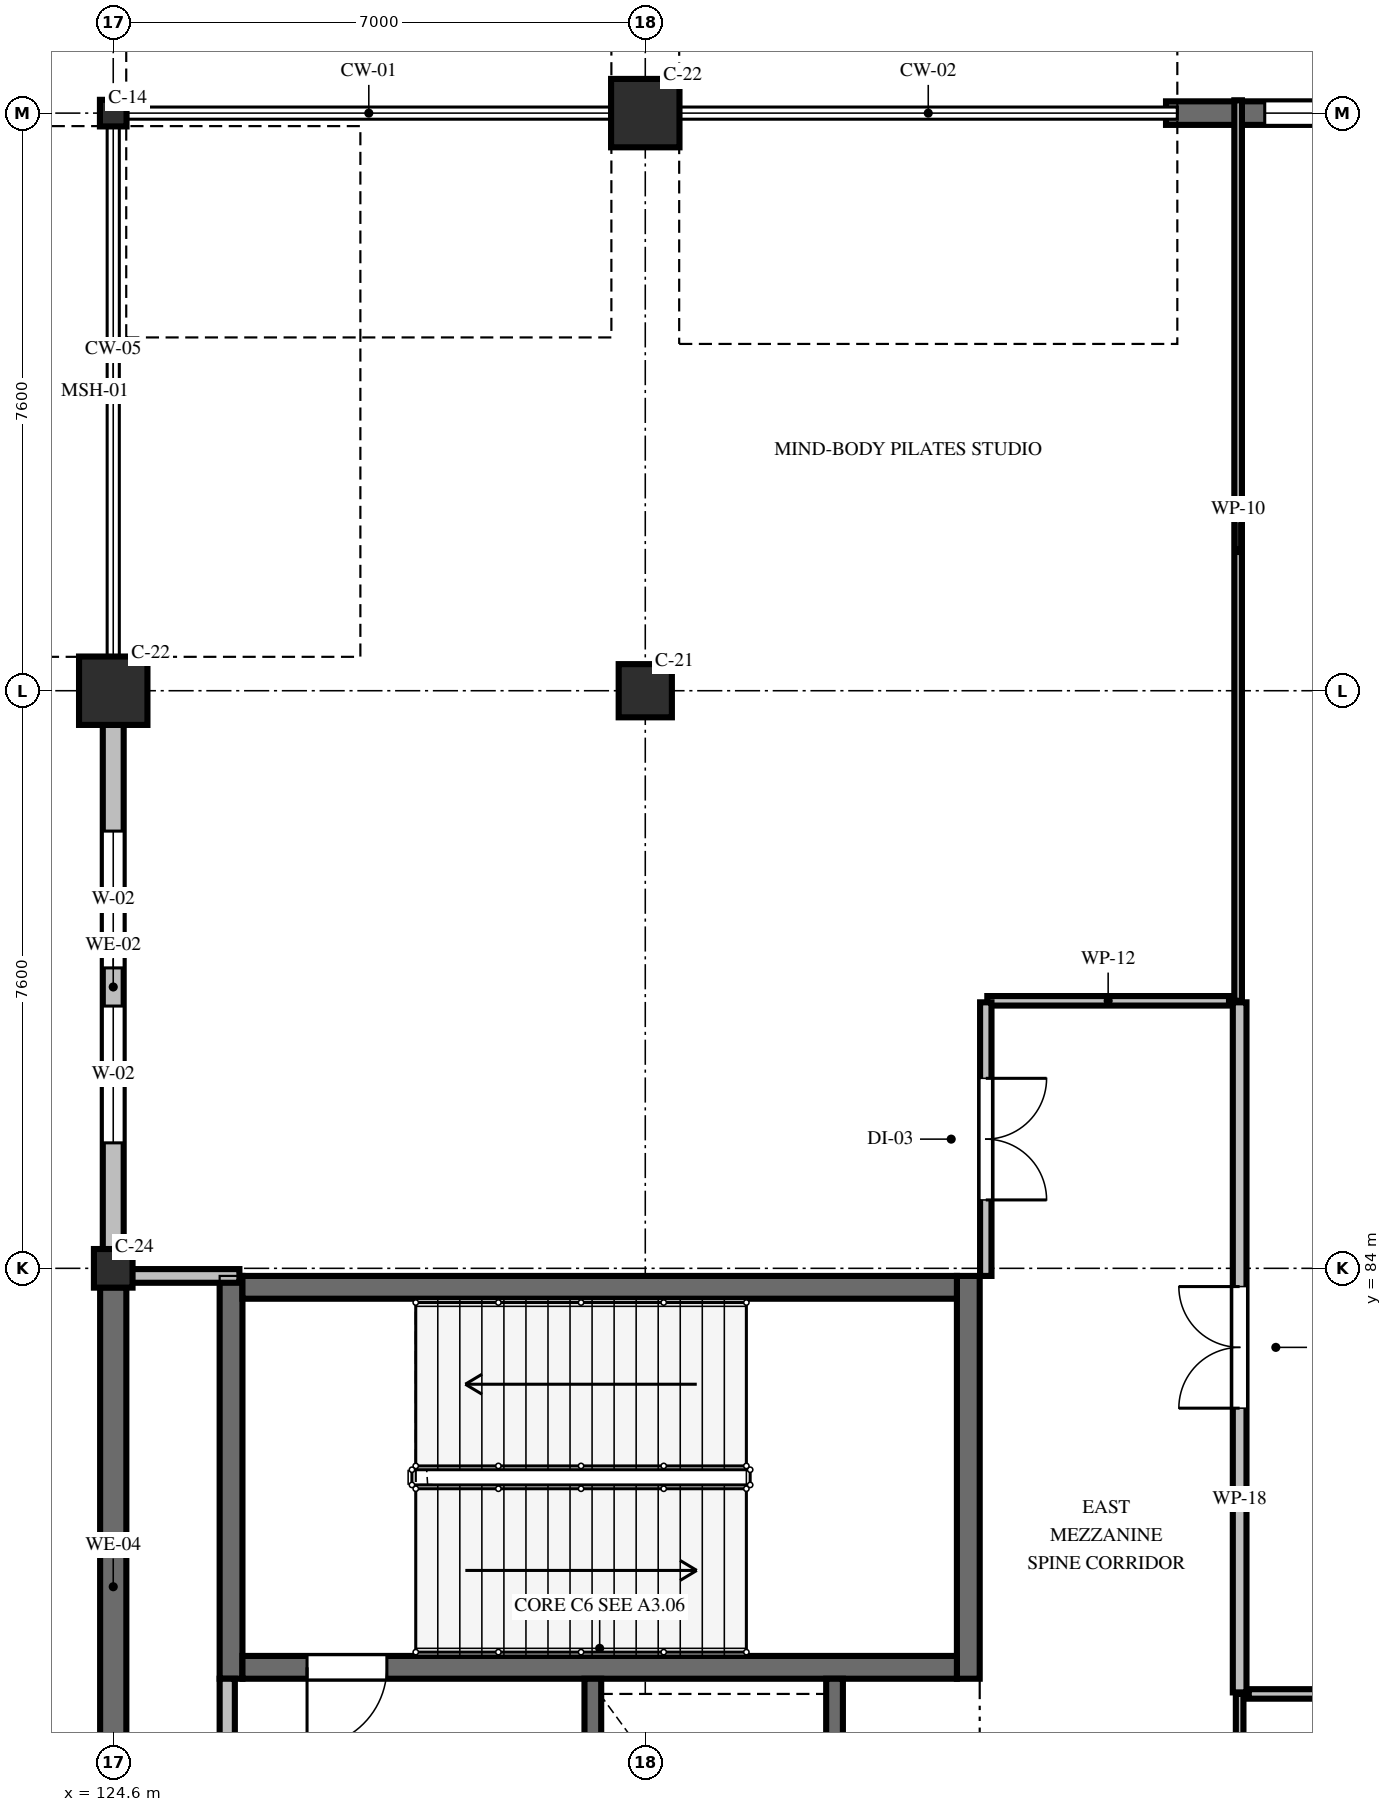
"""IFC4 building model, lengths in metres.
Left out: names, types, materials, properties, quantities, classifications, styles, units other than length and angle.
Written with IfcOpenShell. Run it as: python <this file> out.ifc"""

import sys

from ifc_helpers import new_model, si_unit, direction, frame, frame_2d, origin, origin_2d, place, context, subcontext, project, spatial, rectangle, hollow_rectangle, hollow_circle, i_section, extrude, element, fill, save


model = new_model("IFC4")
c1 = context("Model", 3, precision=1e-05, world=origin(), true_north=direction((0.0, 1.0)))
c2 = subcontext(c1, "Body", "Model", "MODEL_VIEW")
j1 = project(units=[si_unit("LENGTHUNIT", "METRE"), si_unit("PLANEANGLEUNIT", "RADIAN")], contexts=[c1])
p1 = place(None, origin())
s1 = spatial("IfcSite", under=j1, at=p1, CompositionType="ELEMENT")
p2 = place(p1, origin())
s2 = spatial("IfcBuilding", under=s1, at=p2, CompositionType="ELEMENT")
p3 = place(p2, frame((0.0, 0.0, 5.4)))
s3 = spatial("IfcBuildingStorey", under=s2, at=p3, CompositionType="ELEMENT", Elevation=5.4)
p4 = place(p3, frame((124.6, 84.0, 0.0), z_axis=(0.0, 0.0, 1.0), x_axis=(1.0, 0.0, 0.0)))
e1 = element("IfcColumn", 1, at=p4, inside=s3, PredefinedType="COLUMN", context=c2, shape_type="SweptSolid", body=[
    extrude(hollow_circle(Radius=0.254, WallThickness=0.019, at=origin_2d()), origin(), (0.0, 0.0, 1.0), 5.4),
])
p5 = place(p3, frame((124.6, 91.6, 0.0), z_axis=(0.0, 0.0, 1.0), x_axis=(1.0, 0.0, 0.0)))
e2 = element("IfcColumn", 2, at=p5, inside=s3, PredefinedType="COLUMN", context=c2, shape_type="SweptSolid", body=[
    extrude(hollow_rectangle(XDim=0.9, YDim=0.9, WallThickness=0.036, InnerFilletRadius=0.036, OuterFilletRadius=0.072, at=origin_2d()), origin(), (0.0, 0.0, 1.0), 5.4),
])
p6 = place(p3, frame((124.6, 99.2, 0.0), z_axis=(0.0, 0.0, 1.0), x_axis=(1.0, 0.0, 0.0)))
e3 = element("IfcColumn", 3, at=p6, inside=s3, PredefinedType="COLUMN", context=c2, shape_type="SweptSolid", body=[
    extrude(i_section(OverallWidth=0.35, OverallDepth=0.35, WebThickness=0.012, FlangeThickness=0.019, FilletRadius=0.013, at=origin_2d()), origin(), (0.0, 0.0, 1.0), 5.4),
])
p7 = place(p3, frame((131.6, 91.6, 0.0), z_axis=(0.0, 0.0, 1.0), x_axis=(1.0, 0.0, 0.0)))
e4 = element("IfcColumn", 4, at=p7, inside=s3, PredefinedType="COLUMN", context=c2, shape_type="SweptSolid", body=[
    extrude(hollow_rectangle(XDim=0.7, YDim=0.7, WallThickness=0.028, InnerFilletRadius=0.028, OuterFilletRadius=0.056, at=origin_2d()), origin(), (0.0, 0.0, 1.0), 5.4),
])
p8 = place(p3, frame((131.6, 99.2, 0.0), z_axis=(0.0, 0.0, 1.0), x_axis=(1.0, 0.0, 0.0)))
e5 = element("IfcColumn", 5, at=p8, inside=s3, PredefinedType="COLUMN", context=c2, shape_type="SweptSolid", body=[
    extrude(hollow_rectangle(XDim=0.9, YDim=0.9, WallThickness=0.036, InnerFilletRadius=0.036, OuterFilletRadius=0.072, at=origin_2d()), origin(), (0.0, 0.0, 1.0), 5.4),
])
p9 = place(p3, frame((124.6, 75.871, 0.0), z_axis=(0.0, 0.0, 1.0), x_axis=(0.0, 1.0, 0.0)))
e6 = element("IfcWall", 6, at=p9, inside=s3, PredefinedType="SOLIDWALL", context=c2, shape_type="SweptSolid", body=[
    extrude(rectangle(XDim=7.879, YDim=0.345, at=frame_2d((3.939, 0.0))), origin(), (0.0, 0.0, 1.0), 4.578),
])
p10 = place(p3, frame((124.6, 84.25, 0.0), z_axis=(0.0, 0.0, 1.0), x_axis=(0.0, 1.0, 0.0)))
e7 = element("IfcWall", 7, at=p10, inside=s3, PredefinedType="SOLIDWALL", context=c2, shape_type="SweptSolid", body=[
    extrude(rectangle(XDim=6.904, YDim=0.275, at=frame_2d((3.452, 0.0))), origin(), (0.0, 0.0, 1.0), 4.528),
])
p11 = place(p10, frame((1.401, 0.0, 0.9)))
e8 = element("IfcOpeningElement", 8, at=p11, cuts=e7, PredefinedType="OPENING", context=c2, shape_type="SweptSolid", body=[
    extrude(rectangle(XDim=1.8, YDim=1.6, at=frame_2d((0.9, 0.8))), frame((0.0, 0.147, 0.0), z_axis=(0.0, -1.0, 0.0), x_axis=(1.0, 0.0, 0.0)), (0.0, 0.0, 1.0), 0.295),
])
p12 = place(p10, frame((3.703, 0.0, 0.9)))
e9 = element("IfcOpeningElement", 9, at=p12, cuts=e7, PredefinedType="OPENING", context=c2, shape_type="SweptSolid", body=[
    extrude(rectangle(XDim=1.8, YDim=1.6, at=frame_2d((0.9, 0.8))), frame((0.0, 0.147, 0.0), z_axis=(0.0, -1.0, 0.0), x_axis=(1.0, 0.0, 0.0)), (0.0, 0.0, 1.0), 0.295),
])
p13 = place(p3, frame((138.451, 99.2, 0.0), z_axis=(0.0, 0.0, 1.0), x_axis=(1.0, 0.0, 0.0)))
e10 = element("IfcWall", 10, at=p13, inside=s3, PredefinedType="SOLIDWALL", context=c2, shape_type="SweptSolid", body=[
    extrude(rectangle(XDim=6.803, YDim=0.31, at=frame_2d((3.401, 0.0))), origin(), (0.0, 0.0, 1.0), 3.468),
])
p14 = place(p13, frame((1.299, 0.0, 0.9)))
e11 = element("IfcOpeningElement", 11, at=p14, cuts=e10, PredefinedType="OPENING", context=c2, shape_type="SweptSolid", body=[
    extrude(rectangle(XDim=2.1, YDim=1.8, at=frame_2d((1.05, 0.9))), frame((0.0, 0.165, 0.0), z_axis=(0.0, -1.0, 0.0), x_axis=(1.0, 0.0, 0.0)), (0.0, 0.0, 1.0), 0.33),
])
for number, where, z_axis, x_axis in (
    (12, (126.15, 78.6, 0.0), (0.0, 0.0, 1.0), (0.0, 1.0, 0.0)),
    (13, (135.85, 83.9, 0.0), (0.0, 0.0, 1.0), (0.0, -1.0, 0.0)),
):
    element("IfcWall", number, at=place(p3, frame(where, z_axis=z_axis, x_axis=x_axis)), inside=s3, PredefinedType="SHEAR", context=c2, shape_type="SweptSolid", body=[
        extrude(rectangle(XDim=5.3, YDim=0.3, at=frame_2d((2.65, 0.0))), origin(), (0.0, 0.0, 1.0), 5.17),
    ])
p15 = place(p3, frame((135.7, 78.75, 0.0), z_axis=(0.0, 0.0, 1.0), x_axis=(-1.0, 0.0, 0.0)))
e14 = element("IfcWall", 14, at=p15, inside=s3, PredefinedType="SHEAR", context=c2, shape_type="SweptSolid", body=[
    extrude(rectangle(XDim=9.4, YDim=0.3, at=frame_2d((4.7, 0.0))), origin(), (0.0, 0.0, 1.0), 5.17),
])
p16 = place(p15, frame((7.5, 0.0, 0.0)))
e15 = element("IfcOpeningElement", 15, at=p16, cuts=e14, PredefinedType="OPENING", context=c2, shape_type="SweptSolid", body=[
    extrude(rectangle(XDim=1.05, YDim=2.2, at=frame_2d((0.525, 1.1))), frame((0.0, 0.16, 0.0), z_axis=(0.0, -1.0, 0.0), x_axis=(1.0, 0.0, 0.0)), (0.0, 0.0, 1.0), 0.32),
])
p17 = place(p3, frame((126.3, 83.75, 0.0), z_axis=(0.0, 0.0, 1.0), x_axis=(1.0, 0.0, 0.0)))
e16 = element("IfcWall", 16, at=p17, inside=s3, PredefinedType="SHEAR", context=c2, shape_type="SweptSolid", body=[
    extrude(rectangle(XDim=9.4, YDim=0.3, at=frame_2d((4.7, 0.0))), origin(), (0.0, 0.0, 1.0), 5.17),
])
p18 = place(p3, frame((126.1, 74.1, 0.0), z_axis=(0.0, 0.0, 1.0), x_axis=(0.0, 1.0, 0.0)))
e17 = element("IfcWall", 17, at=p18, inside=s3, PredefinedType="SOLIDWALL", context=c2, shape_type="SweptSolid", body=[
    extrude(rectangle(XDim=4.5, YDim=0.2, at=frame_2d((2.25, 0.0))), origin(), (0.0, 0.0, 1.0), 5.05),
])
p19 = place(p3, frame((130.91, 74.1, 0.0), z_axis=(0.0, 0.0, 1.0), x_axis=(0.0, 1.0, 0.0)))
e18 = element("IfcWall", 18, at=p19, inside=s3, PredefinedType="SOLIDWALL", context=c2, shape_type="SweptSolid", body=[
    extrude(rectangle(XDim=4.5, YDim=0.22, at=frame_2d((2.25, 0.0))), origin(), (0.0, 0.0, 1.0), 5.17),
])
p20 = place(p19, frame((1.65, 0.0, 0.0)))
e19 = element("IfcOpeningElement", 19, at=p20, cuts=e18, PredefinedType="OPENING", context=c2, shape_type="SweptSolid", body=[
    extrude(rectangle(XDim=1.2, YDim=2.2, at=frame_2d((0.6, 1.1))), frame((0.0, 0.12, 0.0), z_axis=(0.0, -1.0, 0.0), x_axis=(1.0, 0.0, 0.0)), (0.0, 0.0, 1.0), 0.24),
])
p21 = place(p3, frame((134.09, 74.1, 0.0), z_axis=(0.0, 0.0, 1.0), x_axis=(0.0, 1.0, 0.0)))
e20 = element("IfcWall", 20, at=p21, inside=s3, PredefinedType="SOLIDWALL", context=c2, shape_type="SweptSolid", body=[
    extrude(rectangle(XDim=4.5, YDim=0.22, at=frame_2d((2.25, 0.0))), origin(), (0.0, 0.0, 1.0), 5.17),
])
p22 = place(p3, frame((139.42, 70.6, 0.0), z_axis=(0.0, 0.0, 1.0), x_axis=(0.0, 1.0, 0.0)))
e21 = element("IfcWall", 21, at=p22, inside=s3, PredefinedType="PARTITIONING", context=c2, shape_type="SweptSolid", body=[
    extrude(rectangle(XDim=7.8, YDim=0.1, at=frame_2d((3.9, 0.0))), origin(), (0.0, 0.0, 1.0), 5.05),
])
p23 = place(p22, frame((3.1, 0.0, 0.0)))
e22 = element("IfcOpeningElement", 22, at=p23, cuts=e21, PredefinedType="OPENING", context=c2, shape_type="SweptSolid", body=[
    extrude(rectangle(XDim=1.6, YDim=2.2, at=frame_2d((0.8, 1.1))), frame((0.0, 0.06, 0.0), z_axis=(0.0, -1.0, 0.0), x_axis=(1.0, 0.0, 0.0)), (0.0, 0.0, 1.0), 0.12),
])
p24 = place(p3, frame((139.54, 78.4, 0.0), z_axis=(0.0, 0.0, 1.0), x_axis=(1.0, 0.0, 0.0)))
e23 = element("IfcWall", 23, at=p24, inside=s3, PredefinedType="PARTITIONING", context=c2, shape_type="SweptSolid", body=[
    extrude(rectangle(XDim=5.74, YDim=0.125, at=frame_2d((2.87, 0.0))), origin(), (0.0, 0.0, 1.0), 4.12),
])
p25 = place(p3, frame((139.42, 78.42, 0.0), z_axis=(0.0, 0.0, 1.0), x_axis=(0.0, 1.0, 0.0)))
e24 = element("IfcWall", 24, at=p25, inside=s3, PredefinedType="PARTITIONING", context=c2, shape_type="SweptSolid", body=[
    extrude(rectangle(XDim=9.08, YDim=0.18, at=frame_2d((4.54, 0.0))), origin(), (0.0, 0.0, 1.0), 5.05),
])
p26 = place(p25, frame((3.74, 0.0, 0.0)))
e25 = element("IfcOpeningElement", 25, at=p26, cuts=e24, PredefinedType="OPENING", context=c2, shape_type="SweptSolid", body=[
    extrude(rectangle(XDim=1.6, YDim=2.2, at=frame_2d((0.8, 1.1))), frame((0.0, 0.1, 0.0), z_axis=(0.0, -1.0, 0.0), x_axis=(1.0, 0.0, 0.0)), (0.0, 0.0, 1.0), 0.2),
])
p27 = place(p3, frame((139.4, 87.52, 0.0), z_axis=(0.0, 0.0, 1.0), x_axis=(0.0, 1.0, 0.0)))
e26 = element("IfcWall", 26, at=p27, inside=s3, PredefinedType="PARTITIONING", context=c2, shape_type="SweptSolid", body=[
    extrude(rectangle(XDim=11.849, YDim=0.1, at=frame_2d((5.924, 0.0))), origin(), (0.0, 0.0, 1.0), 3.47),
])
p28 = place(p3, frame((139.28, 87.52, 0.0), z_axis=(0.0, 0.0, 1.0), x_axis=(-1.0, 0.0, 0.0)))
e27 = element("IfcWall", 27, at=p28, inside=s3, PredefinedType="PARTITIONING", context=c2, shape_type="SweptSolid", body=[
    extrude(rectangle(XDim=3.18, YDim=0.125, at=frame_2d((1.59, 0.0))), origin(), (0.0, 0.0, 1.0), 5.0),
])
p29 = place(p3, frame((136.08, 87.5, 0.0), z_axis=(0.0, 0.0, 1.0), x_axis=(0.0, -1.0, 0.0)))
e28 = element("IfcWall", 28, at=p29, inside=s3, PredefinedType="PARTITIONING", context=c2, shape_type="SweptSolid", body=[
    extrude(rectangle(XDim=3.6, YDim=0.15, at=frame_2d((1.8, 0.0))), origin(), (0.0, 0.0, 1.0), 5.0),
])
p30 = place(p29, frame((1.0, 0.0, 0.0)))
e29 = element("IfcOpeningElement", 29, at=p30, cuts=e28, PredefinedType="OPENING", context=c2, shape_type="SweptSolid", body=[
    extrude(rectangle(XDim=1.6, YDim=2.2, at=frame_2d((0.8, 1.1))), frame((0.0, 0.085, 0.0), z_axis=(0.0, -1.0, 0.0), x_axis=(1.0, 0.0, 0.0)), (0.0, 0.0, 1.0), 0.17),
])
p31 = place(p3, frame((126.26, 83.9, 0.0), z_axis=(0.0, 0.0, 1.0), x_axis=(-1.0, 0.0, 0.0)))
e30 = element("IfcWall", 30, at=p31, inside=s3, PredefinedType="PARTITIONING", context=c2, shape_type="SweptSolid", body=[
    extrude(rectangle(XDim=1.497, YDim=0.18, at=frame_2d((0.749, 0.0))), origin(), (0.0, 0.0, 1.0), 4.58),
])
p32 = place(p11, origin())
e31 = element("IfcWindow", 31, at=p32, inside=s3, PartitioningType="SINGLE_PANEL", PredefinedType="WINDOW", context=c2, shape_type="SweptSolid", body=[
    extrude(rectangle(XDim=1.8, YDim=1.6, at=frame_2d((0.9, 0.8))), frame((0.0, 0.03, 0.0), z_axis=(0.0, -1.0, 0.0), x_axis=(1.0, 0.0, 0.0)), (0.0, 0.0, 1.0), 0.06),
])
fill(e8, e31)
p33 = place(p12, origin())
e32 = element("IfcWindow", 32, at=p33, inside=s3, PartitioningType="SINGLE_PANEL", PredefinedType="WINDOW", context=c2, shape_type="SweptSolid", body=[
    extrude(rectangle(XDim=1.8, YDim=1.6, at=frame_2d((0.9, 0.8))), frame((0.0, 0.03, 0.0), z_axis=(0.0, -1.0, 0.0), x_axis=(1.0, 0.0, 0.0)), (0.0, 0.0, 1.0), 0.06),
])
fill(e9, e32)
p34 = place(p14, origin())
e33 = element("IfcWindow", 33, at=p34, inside=s3, PartitioningType="DOUBLE_PANEL_VERTICAL", PredefinedType="WINDOW", context=c2, shape_type="SweptSolid", body=[
    extrude(rectangle(XDim=2.1, YDim=1.8, at=frame_2d((1.05, 0.9))), frame((0.0, 0.03, 0.0), z_axis=(0.0, -1.0, 0.0), x_axis=(1.0, 0.0, 0.0)), (0.0, 0.0, 1.0), 0.06),
])
fill(e11, e33)
p35 = place(p16, origin())
e34 = element("IfcDoor", 34, at=p35, inside=s3, OperationType="SINGLE_SWING_RIGHT", PredefinedType="DOOR", context=c2, shape_type="SweptSolid", body=[
    extrude(rectangle(XDim=1.05, YDim=2.2, at=frame_2d((0.525, 1.1))), frame((0.0, 0.025, 0.0), z_axis=(0.0, -1.0, 0.0), x_axis=(1.0, 0.0, 0.0)), (0.0, 0.0, 1.0), 0.05),
])
fill(e15, e34)
p36 = place(p26, origin())
e35 = element("IfcDoor", 35, at=p36, inside=s3, OperationType="DOUBLE_DOOR_SINGLE_SWING", PredefinedType="DOOR", context=c2, shape_type="SweptSolid", body=[
    extrude(rectangle(XDim=1.6, YDim=2.2, at=frame_2d((0.8, 1.1))), frame((0.0, 0.025, 0.0), z_axis=(0.0, -1.0, 0.0), x_axis=(1.0, 0.0, 0.0)), (0.0, 0.0, 1.0), 0.05),
])
fill(e25, e35)
p37 = place(p30, origin())
e36 = element("IfcDoor", 36, at=p37, inside=s3, OperationType="DOUBLE_DOOR_SINGLE_SWING", PredefinedType="DOOR", context=c2, shape_type="SweptSolid", body=[
    extrude(rectangle(XDim=1.6, YDim=2.2, at=frame_2d((0.8, 1.1))), frame((0.0, 0.025, 0.0), z_axis=(0.0, -1.0, 0.0), x_axis=(1.0, 0.0, 0.0)), (0.0, 0.0, 1.0), 0.05),
])
fill(e29, e36)
save(model, sys.argv[1])
